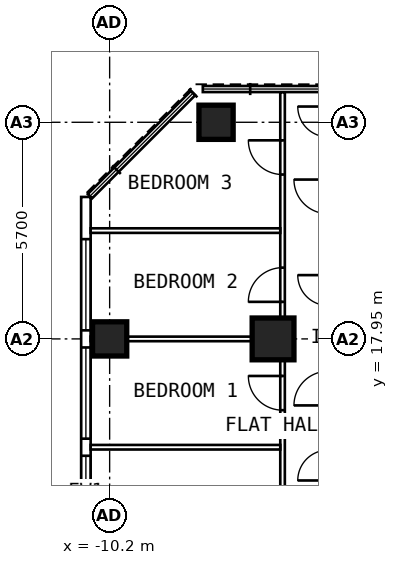
"""IFC4 building model, lengths in metres.
Left out: names, types, materials, properties, quantities, classifications, styles, units other than length and angle.
Written with IfcOpenShell. Run it as: python <this file> out.ifc"""

import sys

from ifc_helpers import new_model, si_unit, direction, frame, frame_2d, origin, origin_2d, place, context, subcontext, project, spatial, rectangle, extrude, element, fill, save


model = new_model("IFC4")
c1 = context("Model", 3, precision=1e-05, world=origin(), true_north=direction((0.0, 1.0)))
c2 = subcontext(c1, "Body", "Model", "MODEL_VIEW")
j1 = project(units=[si_unit("LENGTHUNIT", "METRE"), si_unit("PLANEANGLEUNIT", "RADIAN")], contexts=[c1])
p1 = place(None, origin())
s1 = spatial("IfcSite", under=j1, at=p1, CompositionType="ELEMENT")
p2 = place(p1, origin())
s2 = spatial("IfcBuilding", under=s1, at=p2, CompositionType="ELEMENT")
p3 = place(p2, frame((0.0, 0.0, 197.4)))
s3 = spatial("IfcBuildingStorey", under=s2, at=p3, CompositionType="ELEMENT", Elevation=197.4)
for number, where, z_axis, x_axis in (
    (1, (-10.2, 17.95, 0.0), (0.0, 0.0, 1.0), (0.0, 1.0, 0.0)),
    (2, (-7.4, 23.65, 0.0), (0.0, 0.0, 1.0), (0.0, 1.0, 0.0)),
):
    element("IfcColumn", number, at=place(p3, frame(where, z_axis=z_axis, x_axis=x_axis)), inside=s3, PredefinedType="COLUMN", context=c2, shape_type="SweptSolid", body=[
        extrude(rectangle(XDim=0.9, YDim=0.9, at=origin_2d()), origin(), (0.0, 0.0, 1.0), 3.6),
    ])
p4 = place(p3, frame((-5.9, 17.95, 0.0), z_axis=(0.0, 0.0, 1.0), x_axis=(0.0, 1.0, 0.0)))
e3 = element("IfcColumn", 3, at=p4, inside=s3, PredefinedType="COLUMN", context=c2, shape_type="SweptSolid", body=[
    extrude(rectangle(XDim=1.1, YDim=1.1, at=origin_2d()), origin(), (0.0, 0.0, 1.0), 3.6),
])
p5 = place(p3, frame((-10.825, 6.148, 0.0), z_axis=(0.0, 0.0, 1.0), x_axis=(0.0, 1.0, 0.0)))
e4 = element("IfcWall", 4, at=p5, inside=s3, PredefinedType="SOLIDWALL", context=c2, shape_type="SweptSolid", body=[
    extrude(rectangle(XDim=15.537, YDim=0.25, at=frame_2d((7.769, 0.0))), origin(), (0.0, 0.0, 1.0), 3.35),
])
p6 = place(p5, frame((0.627, 0.0, 0.8)))
e5 = element("IfcOpeningElement", 5, at=p6, cuts=e4, PredefinedType="OPENING", context=c2, shape_type="SweptSolid", body=[
    extrude(rectangle(XDim=2.4, YDim=1.8, at=frame_2d((1.2, 0.9))), frame((0.0, 0.137, 0.0), z_axis=(0.0, -1.0, 0.0), x_axis=(1.0, 0.0, 0.0)), (0.0, 0.0, 1.0), 0.274),
])
p7 = place(p5, frame((3.477, 0.0, 0.8)))
e6 = element("IfcOpeningElement", 6, at=p7, cuts=e4, PredefinedType="OPENING", context=c2, shape_type="SweptSolid", body=[
    extrude(rectangle(XDim=2.4, YDim=1.8, at=frame_2d((1.2, 0.9))), frame((0.0, 0.137, 0.0), z_axis=(0.0, -1.0, 0.0), x_axis=(1.0, 0.0, 0.0)), (0.0, 0.0, 1.0), 0.274),
])
p8 = place(p5, frame((6.327, 0.0, 0.8)))
e7 = element("IfcOpeningElement", 7, at=p8, cuts=e4, PredefinedType="OPENING", context=c2, shape_type="SweptSolid", body=[
    extrude(rectangle(XDim=2.4, YDim=1.8, at=frame_2d((1.2, 0.9))), frame((0.0, 0.137, 0.0), z_axis=(0.0, -1.0, 0.0), x_axis=(1.0, 0.0, 0.0)), (0.0, 0.0, 1.0), 0.274),
])
p9 = place(p5, frame((9.177, 0.0, 0.8)))
e8 = element("IfcOpeningElement", 8, at=p9, cuts=e4, PredefinedType="OPENING", context=c2, shape_type="SweptSolid", body=[
    extrude(rectangle(XDim=2.4, YDim=1.8, at=frame_2d((1.2, 0.9))), frame((0.0, 0.137, 0.0), z_axis=(0.0, -1.0, 0.0), x_axis=(1.0, 0.0, 0.0)), (0.0, 0.0, 1.0), 0.274),
])
p10 = place(p5, frame((12.027, 0.0, 0.8)))
e9 = element("IfcOpeningElement", 9, at=p10, cuts=e4, PredefinedType="OPENING", context=c2, shape_type="SweptSolid", body=[
    extrude(rectangle(XDim=2.4, YDim=1.8, at=frame_2d((1.2, 0.9))), frame((0.0, 0.137, 0.0), z_axis=(0.0, -1.0, 0.0), x_axis=(1.0, 0.0, 0.0)), (0.0, 0.0, 1.0), 0.274),
])
p11 = place(p3, frame((-5.65, 9.6, 0.0), z_axis=(0.0, 0.0, 1.0), x_axis=(0.0, 1.0, 0.0)))
e10 = element("IfcWall", 10, at=p11, inside=s3, PredefinedType="PARTITIONING", context=c2, shape_type="SweptSolid", body=[
    extrude(rectangle(XDim=14.845, YDim=0.12, at=frame_2d((7.422, 0.0))), origin(), (0.0, 0.0, 1.0), 3.35),
])
p12 = place(p11, frame((3.35, 0.0, 0.0)))
e11 = element("IfcOpeningElement", 11, at=p12, cuts=e10, PredefinedType="OPENING", context=c2, shape_type="SweptSolid", body=[
    extrude(rectangle(XDim=0.9, YDim=2.1, at=frame_2d((0.45, 1.05))), frame((0.0, 0.072, 0.0), z_axis=(0.0, -1.0, 0.0), x_axis=(1.0, 0.0, 0.0)), (0.0, 0.0, 1.0), 0.144),
])
p13 = place(p11, frame((6.475, 0.0, 0.0)))
e12 = element("IfcOpeningElement", 12, at=p13, cuts=e10, PredefinedType="OPENING", context=c2, shape_type="SweptSolid", body=[
    extrude(rectangle(XDim=0.9, YDim=2.1, at=frame_2d((0.45, 1.05))), frame((0.0, 0.072, 0.0), z_axis=(0.0, -1.0, 0.0), x_axis=(1.0, 0.0, 0.0)), (0.0, 0.0, 1.0), 0.144),
])
p14 = place(p11, frame((9.325, 0.0, 0.0)))
e13 = element("IfcOpeningElement", 13, at=p14, cuts=e10, PredefinedType="OPENING", context=c2, shape_type="SweptSolid", body=[
    extrude(rectangle(XDim=0.9, YDim=2.1, at=frame_2d((0.45, 1.05))), frame((0.0, 0.072, 0.0), z_axis=(0.0, -1.0, 0.0), x_axis=(1.0, 0.0, 0.0)), (0.0, 0.0, 1.0), 0.144),
])
p15 = place(p11, frame((12.675, 0.0, 0.0)))
e14 = element("IfcOpeningElement", 14, at=p15, cuts=e10, PredefinedType="OPENING", context=c2, shape_type="SweptSolid", body=[
    extrude(rectangle(XDim=0.9, YDim=2.1, at=frame_2d((0.45, 1.05))), frame((0.0, 0.072, 0.0), z_axis=(0.0, -1.0, 0.0), x_axis=(1.0, 0.0, 0.0)), (0.0, 0.0, 1.0), 0.144),
])
p16 = place(p3, frame((-5.71, 15.1, 0.0), z_axis=(0.0, 0.0, 1.0), x_axis=(-1.0, 0.0, 0.0)))
e15 = element("IfcWall", 15, at=p16, inside=s3, PredefinedType="PARTITIONING", context=c2, shape_type="SweptSolid", body=[
    extrude(rectangle(XDim=4.99, YDim=0.12, at=frame_2d((2.495, 0.0))), origin(), (0.0, 0.0, 1.0), 3.35),
])
p17 = place(p3, frame((-5.71, 17.95, 0.0), z_axis=(0.0, 0.0, 1.0), x_axis=(-1.0, 0.0, 0.0)))
e16 = element("IfcWall", 16, at=p17, inside=s3, PredefinedType="PARTITIONING", context=c2, shape_type="SweptSolid", body=[
    extrude(rectangle(XDim=4.99, YDim=0.12, at=frame_2d((2.495, 0.0))), origin(), (0.0, 0.0, 1.0), 2.45),
])
p18 = place(p3, frame((-5.71, 20.8, 0.0), z_axis=(0.0, 0.0, 1.0), x_axis=(-1.0, 0.0, 0.0)))
e17 = element("IfcWall", 17, at=p18, inside=s3, PredefinedType="PARTITIONING", context=c2, shape_type="SweptSolid", body=[
    extrude(rectangle(XDim=4.99, YDim=0.12, at=frame_2d((2.495, 0.0))), origin(), (0.0, 0.0, 1.0), 3.35),
])
p19 = place(p8, origin())
e18 = element("IfcWindow", 18, at=p19, inside=s3, PartitioningType="SINGLE_PANEL", PredefinedType="WINDOW", context=c2, shape_type="SweptSolid", body=[
    extrude(rectangle(XDim=2.4, YDim=1.8, at=frame_2d((1.2, 0.9))), frame((0.0, 0.03, 0.0), z_axis=(0.0, -1.0, 0.0), x_axis=(1.0, 0.0, 0.0)), (0.0, 0.0, 1.0), 0.06),
])
fill(e7, e18)
p20 = place(p9, origin())
e19 = element("IfcWindow", 19, at=p20, inside=s3, PartitioningType="SINGLE_PANEL", PredefinedType="WINDOW", context=c2, shape_type="SweptSolid", body=[
    extrude(rectangle(XDim=2.4, YDim=1.8, at=frame_2d((1.2, 0.9))), frame((0.0, 0.03, 0.0), z_axis=(0.0, -1.0, 0.0), x_axis=(1.0, 0.0, 0.0)), (0.0, 0.0, 1.0), 0.06),
])
fill(e8, e19)
p21 = place(p10, origin())
e20 = element("IfcWindow", 20, at=p21, inside=s3, PartitioningType="SINGLE_PANEL", PredefinedType="WINDOW", context=c2, shape_type="SweptSolid", body=[
    extrude(rectangle(XDim=2.4, YDim=1.8, at=frame_2d((1.2, 0.9))), frame((0.0, 0.03, 0.0), z_axis=(0.0, -1.0, 0.0), x_axis=(1.0, 0.0, 0.0)), (0.0, 0.0, 1.0), 0.06),
])
fill(e9, e20)
p22 = place(p13, origin())
e21 = element("IfcDoor", 21, at=p22, inside=s3, OperationType="SINGLE_SWING_RIGHT", PredefinedType="DOOR", context=c2, shape_type="SweptSolid", body=[
    extrude(rectangle(XDim=0.9, YDim=2.1, at=frame_2d((0.45, 1.05))), frame((0.0, 0.025, 0.0), z_axis=(0.0, -1.0, 0.0), x_axis=(1.0, 0.0, 0.0)), (0.0, 0.0, 1.0), 0.05),
])
fill(e12, e21)
p23 = place(p14, origin())
e22 = element("IfcDoor", 22, at=p23, inside=s3, OperationType="SINGLE_SWING_LEFT", PredefinedType="DOOR", context=c2, shape_type="SweptSolid", body=[
    extrude(rectangle(XDim=0.9, YDim=2.1, at=frame_2d((0.45, 1.05))), frame((0.0, 0.025, 0.0), z_axis=(0.0, -1.0, 0.0), x_axis=(1.0, 0.0, 0.0)), (0.0, 0.0, 1.0), 0.05),
])
fill(e13, e22)
p24 = place(p15, origin())
e23 = element("IfcDoor", 23, at=p24, inside=s3, OperationType="SINGLE_SWING_RIGHT", PredefinedType="DOOR", context=c2, shape_type="SweptSolid", body=[
    extrude(rectangle(XDim=0.9, YDim=2.1, at=frame_2d((0.45, 1.05))), frame((0.0, 0.025, 0.0), z_axis=(0.0, -1.0, 0.0), x_axis=(1.0, 0.0, 0.0)), (0.0, 0.0, 1.0), 0.05),
])
fill(e14, e23)
save(model, sys.argv[1])
